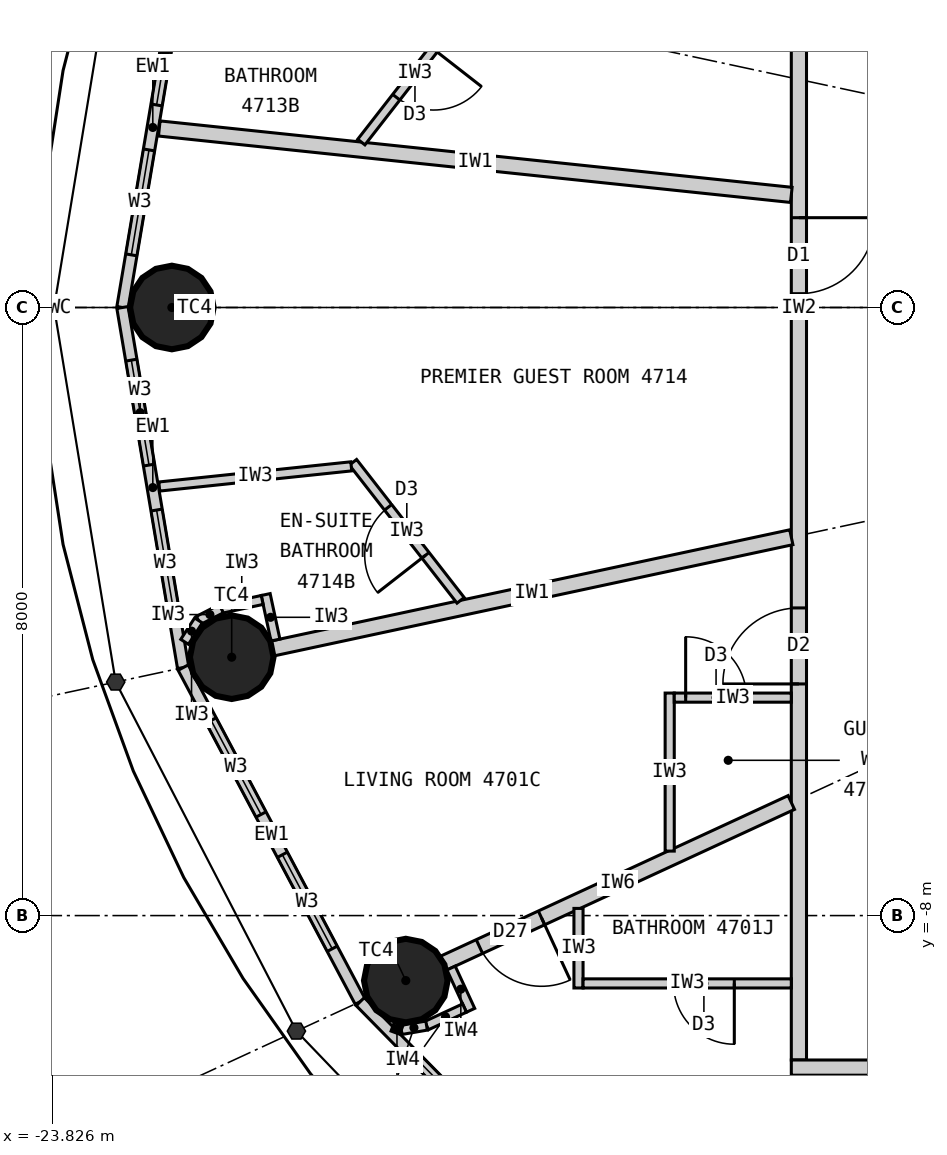
"""IFC4 building model, lengths in metres.
Left out: names, types, materials, properties, quantities, classifications, styles, units other than length and angle.
Written with IfcOpenShell. Run it as: python <this file> out.ifc"""

import sys

from ifc_helpers import new_model, si_unit, direction, frame, frame_2d, origin, origin_2d, place, context, subcontext, project, spatial, rectangle, circle, extrude, element, fill, save


model = new_model("IFC4")
c1 = context("Model", 3, precision=1e-05, world=origin(), true_north=direction((0.0, 1.0)))
c2 = subcontext(c1, "Body", "Model", "MODEL_VIEW")
j1 = project(units=[si_unit("LENGTHUNIT", "METRE"), si_unit("PLANEANGLEUNIT", "RADIAN")], contexts=[c1])
p1 = place(None, origin())
s1 = spatial("IfcSite", under=j1, at=p1, CompositionType="ELEMENT")
p2 = place(p1, origin())
s2 = spatial("IfcBuilding", under=s1, at=p2, CompositionType="ELEMENT")
p3 = place(p2, frame((0.0, 0.0, 176.4)))
s3 = spatial("IfcBuildingStorey", under=s2, at=p3, CompositionType="ELEMENT", Elevation=176.4)
for number, where, z_axis, x_axis in (
    (1, (-22.25, 0.0, 0.0), (0.0, 0.0, 1.0), (1.0, 0.0, 0.0)),
    (2, (-21.463, -4.601, 0.0), (0.0, 0.0, 1.0), (1.0, 0.0, 0.0)),
    (3, (-19.172, -8.855, 0.0), (0.0, 0.0, 1.0), (1.0, 0.0, 0.0)),
):
    element("IfcColumn", number, at=place(p3, frame(where, z_axis=z_axis, x_axis=x_axis)), inside=s3, PredefinedType="COLUMN", context=c2, shape_type="SweptSolid", body=[
        extrude(circle(Radius=0.55, at=origin_2d()), origin(), (0.0, 0.0, 1.0), 3.3),
    ])
p4 = place(p3, frame((-22.102, 4.738, 0.0), z_axis=(0.0, 0.0, 1.0), x_axis=(-0.166162111254, -0.986098449843, 0.0)))
e4 = element("IfcWall", 4, at=p4, inside=s3, PredefinedType="ELEMENTEDWALL", context=c2, shape_type="SweptSolid", body=[
    extrude(rectangle(XDim=4.805, YDim=0.15, at=frame_2d((2.402, 0.0))), origin(), (0.0, 0.0, 1.0), 3.12),
])
p5 = place(p4, frame((0.702, 0.0, 0.9)))
e5 = element("IfcOpeningElement", 5, at=p5, cuts=e4, PredefinedType="OPENING", context=c2, shape_type="SweptSolid", body=[
    extrude(rectangle(XDim=1.4, YDim=1.9, at=frame_2d((0.7, 0.95))), frame((0.0, 0.085, 0.0), z_axis=(0.0, -1.0, 0.0), x_axis=(1.0, 0.0, 0.0)), (0.0, 0.0, 1.0), 0.17),
])
p6 = place(p4, frame((2.702, 0.0, 0.9)))
e6 = element("IfcOpeningElement", 6, at=p6, cuts=e4, PredefinedType="OPENING", context=c2, shape_type="SweptSolid", body=[
    extrude(rectangle(XDim=1.4, YDim=1.9, at=frame_2d((0.7, 0.95))), frame((0.0, 0.085, 0.0), z_axis=(0.0, -1.0, 0.0), x_axis=(1.0, 0.0, 0.0)), (0.0, 0.0, 1.0), 0.17),
])
p7 = place(p3, frame((-22.9, 0.0, 0.0), z_axis=(0.0, 0.0, 1.0), x_axis=(0.166162111254, -0.986098449843, 0.0)))
e7 = element("IfcWall", 7, at=p7, inside=s3, PredefinedType="ELEMENTEDWALL", context=c2, shape_type="SweptSolid", body=[
    extrude(rectangle(XDim=4.805, YDim=0.15, at=frame_2d((2.402, 0.0))), origin(), (0.0, 0.0, 1.0), 3.12),
])
p8 = place(p7, frame((0.702, 0.0, 0.9)))
e8 = element("IfcOpeningElement", 8, at=p8, cuts=e7, PredefinedType="OPENING", context=c2, shape_type="SweptSolid", body=[
    extrude(rectangle(XDim=1.4, YDim=1.9, at=frame_2d((0.7, 0.95))), frame((0.0, 0.085, 0.0), z_axis=(0.0, -1.0, 0.0), x_axis=(1.0, 0.0, 0.0)), (0.0, 0.0, 1.0), 0.17),
])
p9 = place(p7, frame((2.702, 0.0, 0.9)))
e9 = element("IfcOpeningElement", 9, at=p9, cuts=e7, PredefinedType="OPENING", context=c2, shape_type="SweptSolid", body=[
    extrude(rectangle(XDim=1.4, YDim=1.9, at=frame_2d((0.7, 0.95))), frame((0.0, 0.085, 0.0), z_axis=(0.0, -1.0, 0.0), x_axis=(1.0, 0.0, 0.0)), (0.0, 0.0, 1.0), 0.17),
])
p10 = place(p3, frame((-22.102, -4.738, 0.0), z_axis=(0.0, 0.0, 1.0), x_axis=(0.468428906714, -0.883501193748, 0.0)))
e10 = element("IfcWall", 10, at=p10, inside=s3, PredefinedType="ELEMENTEDWALL", context=c2, shape_type="SweptSolid", body=[
    extrude(rectangle(XDim=4.974, YDim=0.15, at=frame_2d((2.487, 0.0))), origin(), (0.0, 0.0, 1.0), 3.12),
])
p11 = place(p10, frame((0.787, 0.0, 0.9)))
e11 = element("IfcOpeningElement", 11, at=p11, cuts=e10, PredefinedType="OPENING", context=c2, shape_type="SweptSolid", body=[
    extrude(rectangle(XDim=1.4, YDim=1.9, at=frame_2d((0.7, 0.95))), frame((0.0, 0.085, 0.0), z_axis=(0.0, -1.0, 0.0), x_axis=(1.0, 0.0, 0.0)), (0.0, 0.0, 1.0), 0.17),
])
p12 = place(p10, frame((2.787, 0.0, 0.9)))
e12 = element("IfcOpeningElement", 12, at=p12, cuts=e10, PredefinedType="OPENING", context=c2, shape_type="SweptSolid", body=[
    extrude(rectangle(XDim=1.4, YDim=1.9, at=frame_2d((0.7, 0.95))), frame((0.0, 0.085, 0.0), z_axis=(0.0, -1.0, 0.0), x_axis=(1.0, 0.0, 0.0)), (0.0, 0.0, 1.0), 0.17),
])
p13 = place(p3, frame((-19.772, -9.132, 0.0), z_axis=(0.0, 0.0, 1.0), x_axis=(0.700727467776, -0.71342905457, 0.0)))
e13 = element("IfcWall", 13, at=p13, inside=s3, PredefinedType="ELEMENTEDWALL", context=c2, shape_type="SweptSolid", body=[
    extrude(rectangle(XDim=5.247, YDim=0.15, at=frame_2d((2.624, 0.0))), origin(), (0.0, 0.0, 1.0), 3.12),
])
p14 = place(p13, frame((0.924, 0.0, 0.9)))
e14 = element("IfcOpeningElement", 14, at=p14, cuts=e13, PredefinedType="OPENING", context=c2, shape_type="SweptSolid", body=[
    extrude(rectangle(XDim=1.4, YDim=1.9, at=frame_2d((0.7, 0.95))), frame((0.0, 0.085, 0.0), z_axis=(0.0, -1.0, 0.0), x_axis=(1.0, 0.0, 0.0)), (0.0, 0.0, 1.0), 0.17),
])
p15 = place(p13, frame((2.924, 0.0, 0.9)))
e15 = element("IfcOpeningElement", 15, at=p15, cuts=e13, PredefinedType="OPENING", context=c2, shape_type="SweptSolid", body=[
    extrude(rectangle(XDim=1.4, YDim=1.9, at=frame_2d((0.7, 0.95))), frame((0.0, 0.085, 0.0), z_axis=(0.0, -1.0, 0.0), x_axis=(1.0, 0.0, 0.0)), (0.0, 0.0, 1.0), 0.17),
])
p16 = place(p3, frame((-14.0, 9.9, 0.0), z_axis=(0.0, 0.0, 1.0), x_axis=(0.0, -1.0, 0.0)))
e16 = element("IfcWall", 16, at=p16, inside=s3, PredefinedType="PARTITIONING", context=c2, shape_type="SweptSolid", body=[
    extrude(rectangle(XDim=19.8, YDim=0.2, at=frame_2d((9.9, 0.0))), origin(), (0.0, 0.0, 1.0), 3.12),
])
p17 = place(p16, frame((13.853, 0.0, 0.0)))
e17 = element("IfcOpeningElement", 17, at=p17, cuts=e16, PredefinedType="OPENING", context=c2, shape_type="SweptSolid", body=[
    extrude(rectangle(XDim=1.0, YDim=2.2, at=frame_2d((0.5, 1.1))), frame((0.0, 0.11, 0.0), z_axis=(0.0, -1.0, 0.0), x_axis=(1.0, 0.0, 0.0)), (0.0, 0.0, 1.0), 0.22),
])
p18 = place(p16, frame((1.1, 0.0, 0.0)))
e18 = element("IfcOpeningElement", 18, at=p18, cuts=e16, PredefinedType="OPENING", context=c2, shape_type="SweptSolid", body=[
    extrude(rectangle(XDim=1.0, YDim=2.2, at=frame_2d((0.5, 1.1))), frame((0.0, 0.11, 0.0), z_axis=(0.0, -1.0, 0.0), x_axis=(1.0, 0.0, 0.0)), (0.0, 0.0, 1.0), 0.22),
])
p19 = place(p16, frame((3.688, 0.0, 0.0)))
e19 = element("IfcOpeningElement", 19, at=p19, cuts=e16, PredefinedType="OPENING", context=c2, shape_type="SweptSolid", body=[
    extrude(rectangle(XDim=1.0, YDim=2.2, at=frame_2d((0.5, 1.1))), frame((0.0, 0.11, 0.0), z_axis=(0.0, -1.0, 0.0), x_axis=(1.0, 0.0, 0.0)), (0.0, 0.0, 1.0), 0.22),
])
p20 = place(p16, frame((8.719, 0.0, 0.0)))
e20 = element("IfcOpeningElement", 20, at=p20, cuts=e16, PredefinedType="OPENING", context=c2, shape_type="SweptSolid", body=[
    extrude(rectangle(XDim=1.0, YDim=2.2, at=frame_2d((0.5, 1.1))), frame((0.0, 0.11, 0.0), z_axis=(0.0, -1.0, 0.0), x_axis=(1.0, 0.0, 0.0)), (0.0, 0.0, 1.0), 0.22),
])
p21 = place(p3, frame((-14.1, 1.481, 0.0), z_axis=(0.0, 0.0, 1.0), x_axis=(-0.994524794819, 0.104500873159, 0.0)))
e21 = element("IfcWall", 21, at=p21, inside=s3, PredefinedType="PARTITIONING", context=c2, shape_type="SweptSolid", body=[
    extrude(rectangle(XDim=8.362, YDim=0.2, at=frame_2d((4.181, 0.0))), origin(), (0.0, 0.0, 1.0), 2.47),
])
p22 = place(p3, frame((-14.1, -3.022, 0.0), z_axis=(0.0, 0.0, 1.0), x_axis=(-0.977790639684, -0.209584028367, 0.0)))
e22 = element("IfcWall", 22, at=p22, inside=s3, PredefinedType="PARTITIONING", context=c2, shape_type="SweptSolid", body=[
    extrude(rectangle(XDim=6.98, YDim=0.2, at=frame_2d((3.49, 0.0))), origin(), (0.0, 0.0, 1.0), 2.42),
])
p23 = place(p3, frame((-14.1, -6.512, 0.0), z_axis=(0.0, 0.0, 1.0), x_axis=(-0.907823150669, -0.419353224751, 0.0)))
e23 = element("IfcWall", 23, at=p23, inside=s3, PredefinedType="PARTITIONING", context=c2, shape_type="SweptSolid", body=[
    extrude(rectangle(XDim=5.037, YDim=0.2, at=frame_2d((2.519, 0.0))), origin(), (0.0, 0.0, 1.0), 2.32),
])
p24 = place(p23, frame((3.62, 0.0, 0.0)))
e24 = element("IfcOpeningElement", 24, at=p24, cuts=e23, PredefinedType="OPENING", context=c2, shape_type="SweptSolid", body=[
    extrude(rectangle(XDim=0.9, YDim=2.1, at=frame_2d((0.45, 1.05))), frame((0.0, 0.11, 0.0), z_axis=(0.0, -1.0, 0.0), x_axis=(1.0, 0.0, 0.0)), (0.0, 0.0, 1.0), 0.22),
])
p25 = place(p3, frame((-12.625, -10.1, 0.0), z_axis=(0.0, 0.0, 1.0), x_axis=(-0.780876185034, -0.624685827954, 0.0)))
e25 = element("IfcWall", 25, at=p25, inside=s3, PredefinedType="PARTITIONING", context=c2, shape_type="SweptSolid", body=[
    extrude(rectangle(XDim=3.229, YDim=0.2, at=frame_2d((1.615, 0.0))), origin(), (0.0, 0.0, 1.0), 2.42),
])
p26 = place(p3, frame((-15.7, -7.152, 0.0), z_axis=(0.0, 0.0, 1.0), x_axis=(0.0, 1.0, 0.0)))
e26 = element("IfcWall", 26, at=p26, inside=s3, PredefinedType="PARTITIONING", context=c2, shape_type="SweptSolid", body=[
    extrude(rectangle(XDim=2.079, YDim=0.12, at=frame_2d((1.04, 0.0))), origin(), (0.0, 0.0, 1.0), 3.12),
])
p27 = place(p3, frame((-14.1, -5.133, 0.0), z_axis=(0.0, 0.0, 1.0), x_axis=(-1.0, 0.0, 0.0)))
e27 = element("IfcWall", 27, at=p27, inside=s3, PredefinedType="PARTITIONING", context=c2, shape_type="SweptSolid", body=[
    extrude(rectangle(XDim=1.54, YDim=0.12, at=frame_2d((0.77, 0.0))), origin(), (0.0, 0.0, 1.0), 3.12),
])
p28 = place(p27, frame((0.59, 0.0, 0.0)))
e28 = element("IfcOpeningElement", 28, at=p28, cuts=e27, PredefinedType="OPENING", context=c2, shape_type="SweptSolid", body=[
    extrude(rectangle(XDim=0.8, YDim=2.1, at=frame_2d((0.4, 1.05))), frame((0.0, 0.07, 0.0), z_axis=(0.0, -1.0, 0.0), x_axis=(1.0, 0.0, 0.0)), (0.0, 0.0, 1.0), 0.14),
])
p29 = place(p3, frame((-16.9, -7.906, 0.0), z_axis=(0.0, 0.0, 1.0), x_axis=(0.0, -1.0, 0.0)))
e29 = element("IfcWall", 29, at=p29, inside=s3, PredefinedType="PARTITIONING", context=c2, shape_type="SweptSolid", body=[
    extrude(rectangle(XDim=1.047, YDim=0.12, at=frame_2d((0.523, 0.0))), origin(), (0.0, 0.0, 1.0), 3.12),
])
p30 = place(p3, frame((-14.1, -8.893, 0.0), z_axis=(0.0, 0.0, 1.0), x_axis=(-1.0, 0.0, 0.0)))
e30 = element("IfcWall", 30, at=p30, inside=s3, PredefinedType="PARTITIONING", context=c2, shape_type="SweptSolid", body=[
    extrude(rectangle(XDim=2.74, YDim=0.12, at=frame_2d((1.37, 0.0))), origin(), (0.0, 0.0, 1.0), 3.12),
])
p31 = place(p30, frame((0.75, 0.0, 0.0)))
e31 = element("IfcOpeningElement", 31, at=p31, cuts=e30, PredefinedType="OPENING", context=c2, shape_type="SweptSolid", body=[
    extrude(rectangle(XDim=0.8, YDim=2.1, at=frame_2d((0.4, 1.05))), frame((0.0, 0.07, 0.0), z_axis=(0.0, -1.0, 0.0), x_axis=(1.0, 0.0, 0.0)), (0.0, 0.0, 1.0), 0.14),
])
p32 = place(p3, frame((-19.758, 2.177, 0.0), z_axis=(0.0, 0.0, 1.0), x_axis=(0.614713147302, 0.788750750576, 0.0)))
e32 = element("IfcWall", 32, at=p32, inside=s3, PredefinedType="PARTITIONING", context=c2, shape_type="SweptSolid", body=[
    extrude(rectangle(XDim=2.296, YDim=0.12, at=frame_2d((1.148, 0.0))), origin(), (0.0, 0.0, 1.0), 3.12),
])
p33 = place(p32, frame((0.748, 0.0, 0.0)))
e33 = element("IfcOpeningElement", 33, at=p33, cuts=e32, PredefinedType="OPENING", context=c2, shape_type="SweptSolid", body=[
    extrude(rectangle(XDim=0.8, YDim=2.1, at=frame_2d((0.4, 1.05))), frame((0.0, 0.07, 0.0), z_axis=(0.0, -1.0, 0.0), x_axis=(1.0, 0.0, 0.0)), (0.0, 0.0, 1.0), 0.14),
])
p34 = place(p3, frame((-18.451, -3.853, 0.0), z_axis=(0.0, 0.0, 1.0), x_axis=(-0.614703538382, 0.788758239197, 0.0)))
e34 = element("IfcWall", 34, at=p34, inside=s3, PredefinedType="PARTITIONING", context=c2, shape_type="SweptSolid", body=[
    extrude(rectangle(XDim=2.303, YDim=0.12, at=frame_2d((1.152, 0.0))), origin(), (0.0, 0.0, 1.0), 3.12),
])
p35 = place(p34, frame((0.752, 0.0, 0.0)))
e35 = element("IfcOpeningElement", 35, at=p35, cuts=e34, PredefinedType="OPENING", context=c2, shape_type="SweptSolid", body=[
    extrude(rectangle(XDim=0.8, YDim=2.1, at=frame_2d((0.4, 1.05))), frame((0.0, 0.07, 0.0), z_axis=(0.0, -1.0, 0.0), x_axis=(1.0, 0.0, 0.0)), (0.0, 0.0, 1.0), 0.14),
])
p36 = place(p3, frame((-19.89, -2.09, 0.0), z_axis=(0.0, 0.0, 1.0), x_axis=(-0.994527025269, -0.104479644, 0.0)))
e36 = element("IfcWall", 36, at=p36, inside=s3, PredefinedType="PARTITIONING", context=c2, shape_type="SweptSolid", body=[
    extrude(rectangle(XDim=2.54, YDim=0.12, at=frame_2d((1.27, 0.0))), origin(), (0.0, 0.0, 1.0), 3.12),
])
p37 = place(p3, frame((-20.887, -4.375, 0.0), z_axis=(0.0, 0.0, 1.0), x_axis=(-0.209746941802, 0.977755705892, 0.0)))
e37 = element("IfcWall", 37, at=p37, inside=s3, PredefinedType="PARTITIONING", context=c2, shape_type="SweptSolid", body=[
    extrude(rectangle(XDim=0.612, YDim=0.12, at=frame_2d((0.306, 0.0))), origin(), (0.0, 0.0, 1.0), 3.12),
])
p38 = place(p3, frame((-21.062, -3.848, 0.0), z_axis=(0.0, 0.0, 1.0), x_axis=(-0.977789415726, -0.209589738521, 0.0)))
e38 = element("IfcWall", 38, at=p38, inside=s3, PredefinedType="PARTITIONING", context=c2, shape_type="SweptSolid", body=[
    extrude(rectangle(XDim=0.55, YDim=0.12, at=frame_2d((0.275, 0.0))), origin(), (0.0, 0.0, 1.0), 3.12),
])
p39 = place(p3, frame((-21.599, -3.963, 0.0), z_axis=(0.0, 0.0, 1.0), x_axis=(-0.890193602875, -0.455582428766, 0.0)))
e39 = element("IfcWall", 39, at=p39, inside=s3, PredefinedType="PARTITIONING", context=c2, shape_type="SweptSolid", body=[
    extrude(rectangle(XDim=0.338, YDim=0.12, at=frame_2d((0.169, 0.0))), origin(), (0.0, 0.0, 1.0), 3.12),
])
p40 = place(p3, frame((-21.9, -4.117, 0.0), z_axis=(0.0, 0.0, 1.0), x_axis=(-0.543582688681, -0.839355622228, 0.0)))
e40 = element("IfcWall", 40, at=p40, inside=s3, PredefinedType="PARTITIONING", context=c2, shape_type="SweptSolid", body=[
    extrude(rectangle(XDim=0.336, YDim=0.12, at=frame_2d((0.168, 0.0))), origin(), (0.0, 0.0, 1.0), 3.12),
])
p41 = place(p3, frame((-0.006, -10.0, 0.0), z_axis=(0.0, 0.0, 1.0), x_axis=(-1.0, 0.0, 0.0)))
e41 = element("IfcWall", 41, at=p41, inside=s3, PredefinedType="PARTITIONING", context=c2, shape_type="SweptSolid", body=[
    extrude(rectangle(XDim=14.094, YDim=0.2, at=frame_2d((7.047, 0.0))), origin(), (0.0, 0.0, 1.0), 3.12),
])
p42 = place(p41, frame((10.059, 0.0, 0.0)))
e42 = element("IfcOpeningElement", 42, at=p42, cuts=e41, PredefinedType="OPENING", context=c2, shape_type="SweptSolid", body=[
    extrude(rectangle(XDim=1.0, YDim=2.2, at=frame_2d((0.5, 1.1))), frame((0.0, 0.11, 0.0), z_axis=(0.0, -1.0, 0.0), x_axis=(1.0, 0.0, 0.0)), (0.0, 0.0, 1.0), 0.22),
])
p43 = place(p3, frame((-18.576, -8.69, 0.0), z_axis=(0.0, 0.0, 1.0), x_axis=(0.419083463716, -0.907947713494, 0.0)))
e43 = element("IfcWall", 43, at=p43, inside=s3, PredefinedType="PARTITIONING", context=c2, shape_type="SweptSolid", body=[
    extrude(rectangle(XDim=0.612, YDim=0.12, at=frame_2d((0.306, 0.0))), origin(), (0.0, 0.0, 1.0), 3.12),
])
p44 = place(p3, frame((-18.399, -9.217, 0.0), z_axis=(0.0, 0.0, 1.0), x_axis=(-0.907933393845, -0.419114485961, 0.0)))
e44 = element("IfcWall", 44, at=p44, inside=s3, PredefinedType="PARTITIONING", context=c2, shape_type="SweptSolid", body=[
    extrude(rectangle(XDim=0.55, YDim=0.12, at=frame_2d((0.275, 0.0))), origin(), (0.0, 0.0, 1.0), 3.12),
])
p45 = place(p3, frame((-18.899, -9.447, 0.0), z_axis=(0.0, 0.0, 1.0), x_axis=(-0.985338822624, -0.170608923066, 0.0)))
e45 = element("IfcWall", 45, at=p45, inside=s3, PredefinedType="PARTITIONING", context=c2, shape_type="SweptSolid", body=[
    extrude(rectangle(XDim=0.338, YDim=0.12, at=frame_2d((0.169, 0.0))), origin(), (0.0, 0.0, 1.0), 3.12),
])
p46 = place(p3, frame((-19.231, -9.505, 0.0), z_axis=(0.0, 0.0, 1.0), x_axis=(-0.938377418573, 0.345612239817, 0.0)))
e46 = element("IfcWall", 46, at=p46, inside=s3, PredefinedType="PARTITIONING", context=c2, shape_type="SweptSolid", body=[
    extrude(rectangle(XDim=0.122, YDim=0.12, at=frame_2d((0.061, 0.0))), origin(), (0.0, 0.0, 1.0), 3.12),
])
p47 = place(p5, origin())
e47 = element("IfcWindow", 47, at=p47, inside=s3, PartitioningType="SINGLE_PANEL", PredefinedType="WINDOW", context=c2, shape_type="SweptSolid", body=[
    extrude(rectangle(XDim=1.4, YDim=1.9, at=frame_2d((0.7, 0.95))), frame((0.0, 0.03, 0.0), z_axis=(0.0, -1.0, 0.0), x_axis=(1.0, 0.0, 0.0)), (0.0, 0.0, 1.0), 0.06),
])
fill(e5, e47)
p48 = place(p6, origin())
e48 = element("IfcWindow", 48, at=p48, inside=s3, PartitioningType="SINGLE_PANEL", PredefinedType="WINDOW", context=c2, shape_type="SweptSolid", body=[
    extrude(rectangle(XDim=1.4, YDim=1.9, at=frame_2d((0.7, 0.95))), frame((0.0, 0.03, 0.0), z_axis=(0.0, -1.0, 0.0), x_axis=(1.0, 0.0, 0.0)), (0.0, 0.0, 1.0), 0.06),
])
fill(e6, e48)
p49 = place(p8, origin())
e49 = element("IfcWindow", 49, at=p49, inside=s3, PartitioningType="SINGLE_PANEL", PredefinedType="WINDOW", context=c2, shape_type="SweptSolid", body=[
    extrude(rectangle(XDim=1.4, YDim=1.9, at=frame_2d((0.7, 0.95))), frame((0.0, 0.03, 0.0), z_axis=(0.0, -1.0, 0.0), x_axis=(1.0, 0.0, 0.0)), (0.0, 0.0, 1.0), 0.06),
])
fill(e8, e49)
p50 = place(p9, origin())
e50 = element("IfcWindow", 50, at=p50, inside=s3, PartitioningType="SINGLE_PANEL", PredefinedType="WINDOW", context=c2, shape_type="SweptSolid", body=[
    extrude(rectangle(XDim=1.4, YDim=1.9, at=frame_2d((0.7, 0.95))), frame((0.0, 0.03, 0.0), z_axis=(0.0, -1.0, 0.0), x_axis=(1.0, 0.0, 0.0)), (0.0, 0.0, 1.0), 0.06),
])
fill(e9, e50)
p51 = place(p11, origin())
e51 = element("IfcWindow", 51, at=p51, inside=s3, PartitioningType="SINGLE_PANEL", PredefinedType="WINDOW", context=c2, shape_type="SweptSolid", body=[
    extrude(rectangle(XDim=1.4, YDim=1.9, at=frame_2d((0.7, 0.95))), frame((0.0, 0.03, 0.0), z_axis=(0.0, -1.0, 0.0), x_axis=(1.0, 0.0, 0.0)), (0.0, 0.0, 1.0), 0.06),
])
fill(e11, e51)
p52 = place(p12, origin())
e52 = element("IfcWindow", 52, at=p52, inside=s3, PartitioningType="SINGLE_PANEL", PredefinedType="WINDOW", context=c2, shape_type="SweptSolid", body=[
    extrude(rectangle(XDim=1.4, YDim=1.9, at=frame_2d((0.7, 0.95))), frame((0.0, 0.03, 0.0), z_axis=(0.0, -1.0, 0.0), x_axis=(1.0, 0.0, 0.0)), (0.0, 0.0, 1.0), 0.06),
])
fill(e12, e52)
p53 = place(p14, origin())
e53 = element("IfcWindow", 53, at=p53, inside=s3, PartitioningType="SINGLE_PANEL", PredefinedType="WINDOW", context=c2, shape_type="SweptSolid", body=[
    extrude(rectangle(XDim=1.4, YDim=1.9, at=frame_2d((0.7, 0.95))), frame((0.0, 0.03, 0.0), z_axis=(0.0, -1.0, 0.0), x_axis=(1.0, 0.0, 0.0)), (0.0, 0.0, 1.0), 0.06),
])
fill(e14, e53)
p54 = place(p28, origin())
e54 = element("IfcDoor", 54, at=p54, inside=s3, OperationType="SINGLE_SWING_RIGHT", PredefinedType="DOOR", context=c2, shape_type="SweptSolid", body=[
    extrude(rectangle(XDim=0.8, YDim=2.1, at=frame_2d((0.4, 1.05))), frame((0.0, 0.025, 0.0), z_axis=(0.0, -1.0, 0.0), x_axis=(1.0, 0.0, 0.0)), (0.0, 0.0, 1.0), 0.05),
])
fill(e28, e54)
p55 = place(p17, origin())
e55 = element("IfcDoor", 55, at=p55, inside=s3, OperationType="SINGLE_SWING_RIGHT", PredefinedType="DOOR", context=c2, shape_type="SweptSolid", body=[
    extrude(rectangle(XDim=1.0, YDim=2.2, at=frame_2d((0.5, 1.1))), frame((0.0, 0.025, 0.0), z_axis=(0.0, -1.0, 0.0), x_axis=(1.0, 0.0, 0.0)), (0.0, 0.0, 1.0), 0.05),
])
fill(e17, e55)
p56 = place(p31, origin())
e56 = element("IfcDoor", 56, at=p56, inside=s3, OperationType="SINGLE_SWING_LEFT", PredefinedType="DOOR", context=c2, shape_type="SweptSolid", body=[
    extrude(rectangle(XDim=0.8, YDim=2.1, at=frame_2d((0.4, 1.05))), frame((0.0, 0.025, 0.0), z_axis=(0.0, -1.0, 0.0), x_axis=(1.0, 0.0, 0.0)), (0.0, 0.0, 1.0), 0.05),
])
fill(e31, e56)
p57 = place(p24, origin())
e57 = element("IfcDoor", 57, at=p57, inside=s3, OperationType="SINGLE_SWING_LEFT", PredefinedType="DOOR", context=c2, shape_type="SweptSolid", body=[
    extrude(rectangle(XDim=0.9, YDim=2.1, at=frame_2d((0.45, 1.05))), frame((0.0, 0.025, 0.0), z_axis=(0.0, -1.0, 0.0), x_axis=(1.0, 0.0, 0.0)), (0.0, 0.0, 1.0), 0.05),
])
fill(e24, e57)
p58 = place(p33, origin())
e58 = element("IfcDoor", 58, at=p58, inside=s3, OperationType="SINGLE_SWING_RIGHT", PredefinedType="DOOR", context=c2, shape_type="SweptSolid", body=[
    extrude(rectangle(XDim=0.8, YDim=2.1, at=frame_2d((0.4, 1.05))), frame((0.0, 0.025, 0.0), z_axis=(0.0, -1.0, 0.0), x_axis=(1.0, 0.0, 0.0)), (0.0, 0.0, 1.0), 0.05),
])
fill(e33, e58)
p59 = place(p35, origin())
e59 = element("IfcDoor", 59, at=p59, inside=s3, OperationType="SINGLE_SWING_LEFT", PredefinedType="DOOR", context=c2, shape_type="SweptSolid", body=[
    extrude(rectangle(XDim=0.8, YDim=2.1, at=frame_2d((0.4, 1.05))), frame((0.0, 0.025, 0.0), z_axis=(0.0, -1.0, 0.0), x_axis=(1.0, 0.0, 0.0)), (0.0, 0.0, 1.0), 0.05),
])
fill(e35, e59)
p60 = place(p20, origin())
e60 = element("IfcDoor", 60, at=p60, inside=s3, OperationType="SINGLE_SWING_LEFT", PredefinedType="DOOR", context=c2, shape_type="SweptSolid", body=[
    extrude(rectangle(XDim=1.0, YDim=2.2, at=frame_2d((0.5, 1.1))), frame((0.0, 0.025, 0.0), z_axis=(0.0, -1.0, 0.0), x_axis=(1.0, 0.0, 0.0)), (0.0, 0.0, 1.0), 0.05),
])
fill(e20, e60)
save(model, sys.argv[1])
